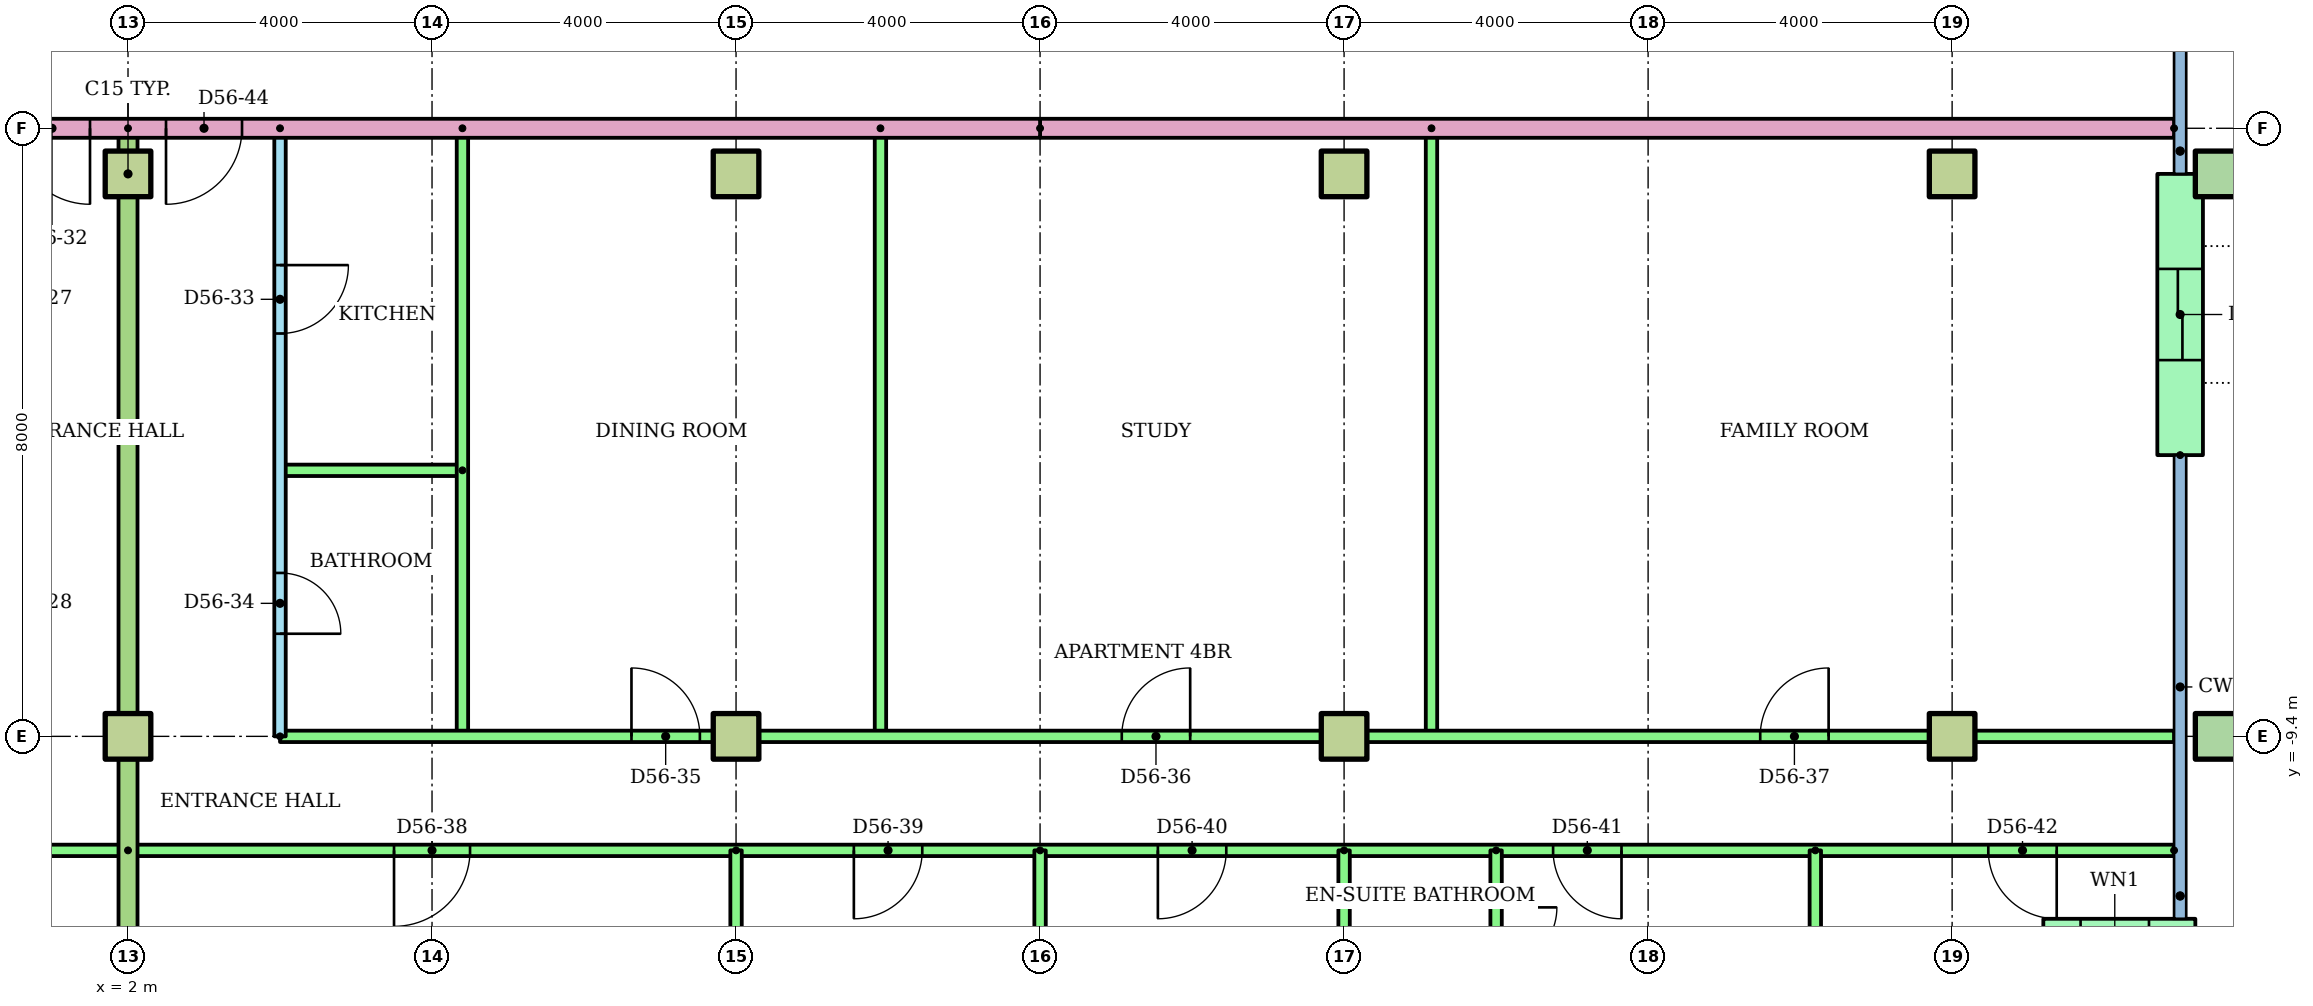
"""IFC4 building model, lengths in metres.
Left out: names, types, materials, properties, quantities, classifications, styles, units other than length and angle.
Written with IfcOpenShell. Run it as: python <this file> out.ifc"""

import sys

from ifc_helpers import new_model, si_unit, direction, frame, frame_2d, origin, origin_2d, place, context, subcontext, project, spatial, rectangle, hollow_rectangle, extrude, element, fill, save


model = new_model("IFC4")
c1 = context("Model", 3, precision=1e-05, world=origin(), true_north=direction((0.0, 1.0)))
c2 = subcontext(c1, "Body", "Model", "MODEL_VIEW")
j1 = project(units=[si_unit("LENGTHUNIT", "METRE"), si_unit("PLANEANGLEUNIT", "RADIAN")], contexts=[c1])
p1 = place(None, origin())
s1 = spatial("IfcSite", under=j1, at=p1, CompositionType="ELEMENT")
p2 = place(p1, origin())
s2 = spatial("IfcBuilding", under=s1, at=p2, CompositionType="ELEMENT")
p3 = place(p2, frame((0.0, 0.0, 217.2)))
s3 = spatial("IfcBuildingStorey", under=s2, at=p3, CompositionType="ELEMENT", Elevation=217.2)
for number, where in (
    (1, (2.0, -9.4, 0.0)),
    (2, (10.0, -9.4, 0.0)),
    (3, (18.0, -9.4, 0.0)),
    (4, (26.0, -9.4, 0.0)),
):
    element("IfcColumn", number, at=place(p3, frame(where)), inside=s3, PredefinedType="COLUMN", context=c2, shape_type="SweptSolid", body=[
        extrude(rectangle(XDim=0.6, YDim=0.6, at=origin_2d()), origin(), (0.0, 0.0, 1.0), 3.2),
    ])
p4 = place(p3, frame((29.5, -9.4, 0.0)))
e5 = element("IfcColumn", 5, at=p4, inside=s3, PredefinedType="COLUMN", context=c2, shape_type="SweptSolid", body=[
    extrude(hollow_rectangle(XDim=0.6, YDim=0.6, WallThickness=0.03, at=origin_2d()), origin(), (0.0, 0.0, 1.0), 3.2),
])
for number, where in (
    (6, (2.0, -2.0, 0.0)),
    (7, (10.0, -2.0, 0.0)),
    (8, (18.0, -2.0, 0.0)),
    (9, (26.0, -2.0, 0.0)),
):
    element("IfcColumn", number, at=place(p3, frame(where)), inside=s3, PredefinedType="COLUMN", context=c2, shape_type="SweptSolid", body=[
        extrude(rectangle(XDim=0.6, YDim=0.6, at=origin_2d()), origin(), (0.0, 0.0, 1.0), 3.2),
    ])
p5 = place(p3, frame((29.5, -2.0, 0.0)))
e10 = element("IfcColumn", 10, at=p5, inside=s3, PredefinedType="COLUMN", context=c2, shape_type="SweptSolid", body=[
    extrude(hollow_rectangle(XDim=0.6, YDim=0.6, WallThickness=0.03, at=origin_2d()), origin(), (0.0, 0.0, 1.0), 3.2),
])
p6 = place(p3, frame((27.2, -12.1, 0.0)))
e11 = element("IfcWall", 11, at=p6, inside=s3, PredefinedType="STANDARD", context=c2, shape_type="SweptSolid", body=[
    extrude(rectangle(XDim=2.0, YDim=0.6, at=frame_2d((1.0, 0.0))), origin(), (0.0, 0.0, 1.0), 2.92),
])
p7 = place(p6, frame((0.49, 0.0, 0.9)))
e12 = element("IfcOpeningElement", 12, at=p7, cuts=e11, PredefinedType="OPENING", context=c2, shape_type="SweptSolid", body=[
    extrude(rectangle(XDim=0.9, YDim=1.5, at=frame_2d((0.45, 0.75))), frame((0.0, 0.31, 0.0), z_axis=(0.0, -1.0, 0.0), x_axis=(1.0, 0.0, 0.0)), (0.0, 0.0, 1.0), 0.62),
])
p8 = place(p3, frame((29.0, -5.7, 0.0), z_axis=(0.0, 0.0, 1.0), x_axis=(0.0, 1.0, 0.0)))
e13 = element("IfcWall", 13, at=p8, inside=s3, PredefinedType="STANDARD", context=c2, shape_type="SweptSolid", body=[
    extrude(rectangle(XDim=3.7, YDim=0.6, at=frame_2d((1.85, 0.0))), origin(), (0.0, 0.0, 1.0), 2.92),
])
p9 = place(p8, frame((1.25, 0.0, 0.0)))
e14 = element("IfcOpeningElement", 14, at=p9, cuts=e13, PredefinedType="OPENING", context=c2, shape_type="SweptSolid", body=[
    extrude(rectangle(XDim=1.2, YDim=2.1, at=frame_2d((0.6, 1.05))), frame((0.0, 0.31, 0.0), z_axis=(0.0, -1.0, 0.0), x_axis=(1.0, 0.0, 0.0)), (0.0, 0.0, 1.0), 0.62),
])
p10 = place(p3, frame((2.0, -10.9, 0.0), z_axis=(0.0, 0.0, 1.0), x_axis=(-1.0, 0.0, 0.0)))
e15 = element("IfcWall", 15, at=p10, inside=s3, PredefinedType="PARTITIONING", context=c2, shape_type="SweptSolid", body=[
    extrude(rectangle(XDim=8.0, YDim=0.15, at=frame_2d((4.0, 0.0))), origin(), (0.0, 0.0, 1.0), 2.4),
])
p11 = place(p10, frame((5.55, 0.0, 0.0)))
e16 = element("IfcOpeningElement", 16, at=p11, cuts=e15, PredefinedType="OPENING", context=c2, shape_type="SweptSolid", body=[
    extrude(rectangle(XDim=0.9, YDim=2.1, at=frame_2d((0.45, 1.05))), frame((0.0, 0.085, 0.0), z_axis=(0.0, -1.0, 0.0), x_axis=(1.0, 0.0, 0.0)), (0.0, 0.0, 1.0), 0.17),
])
p12 = place(p10, frame((1.5, 0.0, 0.0)))
e17 = element("IfcOpeningElement", 17, at=p12, cuts=e15, PredefinedType="OPENING", context=c2, shape_type="SweptSolid", body=[
    extrude(rectangle(XDim=1.0, YDim=2.1, at=frame_2d((0.5, 1.05))), frame((0.0, 0.085, 0.0), z_axis=(0.0, -1.0, 0.0), x_axis=(1.0, 0.0, 0.0)), (0.0, 0.0, 1.0), 0.17),
])
p13 = place(p3, frame((4.0, -1.4, 0.0), z_axis=(0.0, 0.0, 1.0), x_axis=(0.0, -1.0, 0.0)))
e18 = element("IfcWall", 18, at=p13, inside=s3, PredefinedType="PARTITIONING", context=c2, shape_type="SweptSolid", body=[
    extrude(rectangle(XDim=8.0, YDim=0.15, at=frame_2d((4.0, 0.0))), origin(), (0.0, 0.0, 1.0), 2.4),
])
p14 = place(p13, frame((1.8, 0.0, 0.0)))
e19 = element("IfcOpeningElement", 19, at=p14, cuts=e18, PredefinedType="OPENING", context=c2, shape_type="SweptSolid", body=[
    extrude(rectangle(XDim=0.9, YDim=2.1, at=frame_2d((0.45, 1.05))), frame((0.0, 0.085, 0.0), z_axis=(0.0, -1.0, 0.0), x_axis=(1.0, 0.0, 0.0)), (0.0, 0.0, 1.0), 0.17),
])
p15 = place(p13, frame((5.85, 0.0, 0.0)))
e20 = element("IfcOpeningElement", 20, at=p15, cuts=e18, PredefinedType="OPENING", context=c2, shape_type="SweptSolid", body=[
    extrude(rectangle(XDim=0.8, YDim=2.1, at=frame_2d((0.4, 1.05))), frame((0.0, 0.085, 0.0), z_axis=(0.0, -1.0, 0.0), x_axis=(1.0, 0.0, 0.0)), (0.0, 0.0, 1.0), 0.17),
])
p16 = place(p3, frame((6.4, -5.9, 0.0), z_axis=(0.0, 0.0, 1.0), x_axis=(-1.0, 0.0, 0.0)))
e21 = element("IfcWall", 21, at=p16, inside=s3, PredefinedType="PARTITIONING", context=c2, shape_type="SweptSolid", body=[
    extrude(rectangle(XDim=2.4, YDim=0.15, at=frame_2d((1.2, 0.0))), origin(), (0.0, 0.0, 1.0), 2.4),
])
for number, where, z_axis, x_axis in (
    (22, (6.4, -1.4, 0.0), (0.0, 0.0, 1.0), (0.0, -1.0, 0.0)),
    (23, (11.9, -1.4, 0.0), (0.0, 0.0, 1.0), (0.0, -1.0, 0.0)),
    (24, (19.15, -1.4, 0.0), (0.0, 0.0, 1.0), (0.0, -1.0, 0.0)),
):
    element("IfcWall", number, at=place(p3, frame(where, z_axis=z_axis, x_axis=x_axis)), inside=s3, PredefinedType="PARTITIONING", context=c2, shape_type="SweptSolid", body=[
        extrude(rectangle(XDim=8.0, YDim=0.15, at=frame_2d((4.0, 0.0))), origin(), (0.0, 0.0, 1.0), 2.4),
    ])
p17 = place(p3, frame((4.0, -9.4, 0.0)))
e25 = element("IfcWall", 25, at=p17, inside=s3, PredefinedType="PARTITIONING", context=c2, shape_type="SweptSolid", body=[
    extrude(rectangle(XDim=24.92, YDim=0.15, at=frame_2d((12.46, 0.0))), origin(), (0.0, 0.0, 1.0), 2.4),
])
p18 = place(p17, frame((4.624, 0.0, 0.0)))
e26 = element("IfcOpeningElement", 26, at=p18, cuts=e25, PredefinedType="OPENING", context=c2, shape_type="SweptSolid", body=[
    extrude(rectangle(XDim=0.9, YDim=2.1, at=frame_2d((0.45, 1.05))), frame((0.0, 0.085, 0.0), z_axis=(0.0, -1.0, 0.0), x_axis=(1.0, 0.0, 0.0)), (0.0, 0.0, 1.0), 0.17),
])
p19 = place(p17, frame((11.075, 0.0, 0.0)))
e27 = element("IfcOpeningElement", 27, at=p19, cuts=e25, PredefinedType="OPENING", context=c2, shape_type="SweptSolid", body=[
    extrude(rectangle(XDim=0.9, YDim=2.1, at=frame_2d((0.45, 1.05))), frame((0.0, 0.085, 0.0), z_axis=(0.0, -1.0, 0.0), x_axis=(1.0, 0.0, 0.0)), (0.0, 0.0, 1.0), 0.17),
])
p20 = place(p17, frame((19.475, 0.0, 0.0)))
e28 = element("IfcOpeningElement", 28, at=p20, cuts=e25, PredefinedType="OPENING", context=c2, shape_type="SweptSolid", body=[
    extrude(rectangle(XDim=0.9, YDim=2.1, at=frame_2d((0.45, 1.05))), frame((0.0, 0.085, 0.0), z_axis=(0.0, -1.0, 0.0), x_axis=(1.0, 0.0, 0.0)), (0.0, 0.0, 1.0), 0.17),
])
p21 = place(p3, frame((28.92, -10.9, 0.0), z_axis=(0.0, 0.0, 1.0), x_axis=(-1.0, 0.0, 0.0)))
e29 = element("IfcWall", 29, at=p21, inside=s3, PredefinedType="PARTITIONING", context=c2, shape_type="SweptSolid", body=[
    extrude(rectangle(XDim=26.92, YDim=0.15, at=frame_2d((13.46, 0.0))), origin(), (0.0, 0.0, 1.0), 2.4),
])
p22 = place(p21, frame((22.42, 0.0, 0.0)))
e30 = element("IfcOpeningElement", 30, at=p22, cuts=e29, PredefinedType="OPENING", context=c2, shape_type="SweptSolid", body=[
    extrude(rectangle(XDim=1.0, YDim=2.1, at=frame_2d((0.5, 1.05))), frame((0.0, 0.085, 0.0), z_axis=(0.0, -1.0, 0.0), x_axis=(1.0, 0.0, 0.0)), (0.0, 0.0, 1.0), 0.17),
])
p23 = place(p21, frame((16.47, 0.0, 0.0)))
e31 = element("IfcOpeningElement", 31, at=p23, cuts=e29, PredefinedType="OPENING", context=c2, shape_type="SweptSolid", body=[
    extrude(rectangle(XDim=0.9, YDim=2.1, at=frame_2d((0.45, 1.05))), frame((0.0, 0.085, 0.0), z_axis=(0.0, -1.0, 0.0), x_axis=(1.0, 0.0, 0.0)), (0.0, 0.0, 1.0), 0.17),
])
p24 = place(p21, frame((12.47, 0.0, 0.0)))
e32 = element("IfcOpeningElement", 32, at=p24, cuts=e29, PredefinedType="OPENING", context=c2, shape_type="SweptSolid", body=[
    extrude(rectangle(XDim=0.9, YDim=2.1, at=frame_2d((0.45, 1.05))), frame((0.0, 0.085, 0.0), z_axis=(0.0, -1.0, 0.0), x_axis=(1.0, 0.0, 0.0)), (0.0, 0.0, 1.0), 0.17),
])
p25 = place(p21, frame((7.27, 0.0, 0.0)))
e33 = element("IfcOpeningElement", 33, at=p25, cuts=e29, PredefinedType="OPENING", context=c2, shape_type="SweptSolid", body=[
    extrude(rectangle(XDim=0.9, YDim=2.1, at=frame_2d((0.45, 1.05))), frame((0.0, 0.085, 0.0), z_axis=(0.0, -1.0, 0.0), x_axis=(1.0, 0.0, 0.0)), (0.0, 0.0, 1.0), 0.17),
])
p26 = place(p21, frame((1.544, 0.0, 0.0)))
e34 = element("IfcOpeningElement", 34, at=p26, cuts=e29, PredefinedType="OPENING", context=c2, shape_type="SweptSolid", body=[
    extrude(rectangle(XDim=0.9, YDim=2.1, at=frame_2d((0.45, 1.05))), frame((0.0, 0.085, 0.0), z_axis=(0.0, -1.0, 0.0), x_axis=(1.0, 0.0, 0.0)), (0.0, 0.0, 1.0), 0.17),
])
p27 = place(p3, frame((10.0, -10.9, 0.0), z_axis=(0.0, 0.0, 1.0), x_axis=(0.0, -1.0, 0.0)))
e35 = element("IfcWall", 35, at=p27, inside=s3, PredefinedType="PARTITIONING", context=c2, shape_type="SweptSolid", body=[
    extrude(rectangle(XDim=5.61, YDim=0.15, at=frame_2d((2.805, 0.0))), origin(), (0.0, 0.0, 1.0), 2.4),
])
p28 = place(p3, frame((14.0, -10.9, 0.0), z_axis=(0.0, 0.0, 1.0), x_axis=(0.0, -1.0, 0.0)))
e36 = element("IfcWall", 36, at=p28, inside=s3, PredefinedType="PARTITIONING", context=c2, shape_type="SweptSolid", body=[
    extrude(rectangle(XDim=5.621, YDim=0.15, at=frame_2d((2.811, 0.0))), origin(), (0.0, 0.0, 1.0), 2.4),
])
p29 = place(p3, frame((18.0, -10.9, 0.0), z_axis=(0.0, 0.0, 1.0), x_axis=(0.0, -1.0, 0.0)))
e37 = element("IfcWall", 37, at=p29, inside=s3, PredefinedType="PARTITIONING", context=c2, shape_type="SweptSolid", body=[
    extrude(rectangle(XDim=5.61, YDim=0.15, at=frame_2d((2.805, 0.0))), origin(), (0.0, 0.0, 1.0), 2.4),
])
p30 = place(p3, frame((24.2, -10.9, 0.0), z_axis=(0.0, 0.0, 1.0), x_axis=(0.0, -1.0, 0.0)))
e38 = element("IfcWall", 38, at=p30, inside=s3, PredefinedType="PARTITIONING", context=c2, shape_type="SweptSolid", body=[
    extrude(rectangle(XDim=3.82, YDim=0.15, at=frame_2d((1.91, 0.0))), origin(), (0.0, 0.0, 1.0), 2.4),
])
p31 = place(p3, frame((20.0, -10.9, 0.0), z_axis=(0.0, 0.0, 1.0), x_axis=(0.0, -1.0, 0.0)))
e39 = element("IfcWall", 39, at=p31, inside=s3, PredefinedType="PARTITIONING", context=c2, shape_type="SweptSolid", body=[
    extrude(rectangle(XDim=2.3, YDim=0.15, at=frame_2d((1.15, 0.0))), origin(), (0.0, 0.0, 1.0), 2.4),
])
p32 = place(p31, frame((0.75, 0.0, 0.0)))
e40 = element("IfcOpeningElement", 40, at=p32, cuts=e39, PredefinedType="OPENING", context=c2, shape_type="SweptSolid", body=[
    extrude(rectangle(XDim=0.8, YDim=2.1, at=frame_2d((0.4, 1.05))), frame((0.0, 0.085, 0.0), z_axis=(0.0, -1.0, 0.0), x_axis=(1.0, 0.0, 0.0)), (0.0, 0.0, 1.0), 0.17),
])
p33 = place(p3, frame((2.0, -1.4, 0.0), z_axis=(0.0, 0.0, 1.0), x_axis=(0.0, -1.0, 0.0)))
e41 = element("IfcWall", 41, at=p33, inside=s3, PredefinedType="PARTITIONING", context=c2, shape_type="SweptSolid", body=[
    extrude(rectangle(XDim=15.11, YDim=0.25, at=frame_2d((7.555, 0.0))), origin(), (0.0, 0.0, 1.0), 2.4),
])
p34 = place(p3, frame((28.92, -1.4, 0.0), z_axis=(0.0, 0.0, 1.0), x_axis=(-1.0, 0.0, 0.0)))
e42 = element("IfcWall", 42, at=p34, inside=s3, PredefinedType="PARTITIONING", context=c2, shape_type="SweptSolid", body=[
    extrude(rectangle(XDim=14.92, YDim=0.25, at=frame_2d((7.46, 0.0))), origin(), (0.0, 0.0, 1.0), 2.4),
])
p35 = place(p3, frame((14.0, -1.4, 0.0), z_axis=(0.0, 0.0, 1.0), x_axis=(-1.0, 0.0, 0.0)))
e43 = element("IfcWall", 43, at=p35, inside=s3, PredefinedType="PARTITIONING", context=c2, shape_type="SweptSolid", body=[
    extrude(rectangle(XDim=28.0, YDim=0.25, at=frame_2d((14.0, 0.0))), origin(), (0.0, 0.0, 1.0), 2.4),
])
p36 = place(p35, frame((20.5, 0.0, 0.0)))
e44 = element("IfcOpeningElement", 44, at=p36, cuts=e43, PredefinedType="OPENING", context=c2, shape_type="SweptSolid", body=[
    extrude(rectangle(XDim=1.0, YDim=2.1, at=frame_2d((0.5, 1.05))), frame((0.0, 0.135, 0.0), z_axis=(0.0, -1.0, 0.0), x_axis=(1.0, 0.0, 0.0)), (0.0, 0.0, 1.0), 0.27),
])
p37 = place(p35, frame((12.5, 0.0, 0.0)))
e45 = element("IfcOpeningElement", 45, at=p37, cuts=e43, PredefinedType="OPENING", context=c2, shape_type="SweptSolid", body=[
    extrude(rectangle(XDim=1.0, YDim=2.1, at=frame_2d((0.5, 1.05))), frame((0.0, 0.135, 0.0), z_axis=(0.0, -1.0, 0.0), x_axis=(1.0, 0.0, 0.0)), (0.0, 0.0, 1.0), 0.27),
])
p38 = place(p35, frame((10.5, 0.0, 0.0)))
e46 = element("IfcOpeningElement", 46, at=p38, cuts=e43, PredefinedType="OPENING", context=c2, shape_type="SweptSolid", body=[
    extrude(rectangle(XDim=1.0, YDim=2.1, at=frame_2d((0.5, 1.05))), frame((0.0, 0.135, 0.0), z_axis=(0.0, -1.0, 0.0), x_axis=(1.0, 0.0, 0.0)), (0.0, 0.0, 1.0), 0.27),
])
p39 = place(p37, origin())
e47 = element("IfcDoor", 47, at=p39, inside=s3, OperationType="SINGLE_SWING_LEFT", PredefinedType="DOOR", context=c2, shape_type="SweptSolid", body=[
    extrude(rectangle(XDim=1.0, YDim=2.1, at=frame_2d((0.5, 1.05))), frame((0.0, 0.025, 0.0), z_axis=(0.0, -1.0, 0.0), x_axis=(1.0, 0.0, 0.0)), (0.0, 0.0, 1.0), 0.05),
])
fill(e45, e47)
p40 = place(p14, origin())
e48 = element("IfcDoor", 48, at=p40, inside=s3, OperationType="SINGLE_SWING_LEFT", PredefinedType="DOOR", context=c2, shape_type="SweptSolid", body=[
    extrude(rectangle(XDim=0.9, YDim=2.1, at=frame_2d((0.45, 1.05))), frame((0.0, 0.025, 0.0), z_axis=(0.0, -1.0, 0.0), x_axis=(1.0, 0.0, 0.0)), (0.0, 0.0, 1.0), 0.05),
])
fill(e19, e48)
p41 = place(p15, origin())
e49 = element("IfcDoor", 49, at=p41, inside=s3, OperationType="SINGLE_SWING_RIGHT", PredefinedType="DOOR", context=c2, shape_type="SweptSolid", body=[
    extrude(rectangle(XDim=0.8, YDim=2.1, at=frame_2d((0.4, 1.05))), frame((0.0, 0.025, 0.0), z_axis=(0.0, -1.0, 0.0), x_axis=(1.0, 0.0, 0.0)), (0.0, 0.0, 1.0), 0.05),
])
fill(e20, e49)
p42 = place(p18, origin())
e50 = element("IfcDoor", 50, at=p42, inside=s3, OperationType="SINGLE_SWING_LEFT", PredefinedType="DOOR", context=c2, shape_type="SweptSolid", body=[
    extrude(rectangle(XDim=0.9, YDim=2.1, at=frame_2d((0.45, 1.05))), frame((0.0, 0.025, 0.0), z_axis=(0.0, -1.0, 0.0), x_axis=(1.0, 0.0, 0.0)), (0.0, 0.0, 1.0), 0.05),
])
fill(e26, e50)
p43 = place(p19, origin())
e51 = element("IfcDoor", 51, at=p43, inside=s3, OperationType="SINGLE_SWING_RIGHT", PredefinedType="DOOR", context=c2, shape_type="SweptSolid", body=[
    extrude(rectangle(XDim=0.9, YDim=2.1, at=frame_2d((0.45, 1.05))), frame((0.0, 0.025, 0.0), z_axis=(0.0, -1.0, 0.0), x_axis=(1.0, 0.0, 0.0)), (0.0, 0.0, 1.0), 0.05),
])
fill(e27, e51)
p44 = place(p20, origin())
e52 = element("IfcDoor", 52, at=p44, inside=s3, OperationType="SINGLE_SWING_RIGHT", PredefinedType="DOOR", context=c2, shape_type="SweptSolid", body=[
    extrude(rectangle(XDim=0.9, YDim=2.1, at=frame_2d((0.45, 1.05))), frame((0.0, 0.025, 0.0), z_axis=(0.0, -1.0, 0.0), x_axis=(1.0, 0.0, 0.0)), (0.0, 0.0, 1.0), 0.05),
])
fill(e28, e52)
p45 = place(p22, origin())
e53 = element("IfcDoor", 53, at=p45, inside=s3, OperationType="SINGLE_SWING_RIGHT", PredefinedType="DOOR", context=c2, shape_type="SweptSolid", body=[
    extrude(rectangle(XDim=1.0, YDim=2.1, at=frame_2d((0.5, 1.05))), frame((0.0, 0.025, 0.0), z_axis=(0.0, -1.0, 0.0), x_axis=(1.0, 0.0, 0.0)), (0.0, 0.0, 1.0), 0.05),
])
fill(e30, e53)
p46 = place(p23, origin())
e54 = element("IfcDoor", 54, at=p46, inside=s3, OperationType="SINGLE_SWING_RIGHT", PredefinedType="DOOR", context=c2, shape_type="SweptSolid", body=[
    extrude(rectangle(XDim=0.9, YDim=2.1, at=frame_2d((0.45, 1.05))), frame((0.0, 0.025, 0.0), z_axis=(0.0, -1.0, 0.0), x_axis=(1.0, 0.0, 0.0)), (0.0, 0.0, 1.0), 0.05),
])
fill(e31, e54)
p47 = place(p24, origin())
e55 = element("IfcDoor", 55, at=p47, inside=s3, OperationType="SINGLE_SWING_RIGHT", PredefinedType="DOOR", context=c2, shape_type="SweptSolid", body=[
    extrude(rectangle(XDim=0.9, YDim=2.1, at=frame_2d((0.45, 1.05))), frame((0.0, 0.025, 0.0), z_axis=(0.0, -1.0, 0.0), x_axis=(1.0, 0.0, 0.0)), (0.0, 0.0, 1.0), 0.05),
])
fill(e32, e55)
p48 = place(p25, origin())
e56 = element("IfcDoor", 56, at=p48, inside=s3, OperationType="SINGLE_SWING_LEFT", PredefinedType="DOOR", context=c2, shape_type="SweptSolid", body=[
    extrude(rectangle(XDim=0.9, YDim=2.1, at=frame_2d((0.45, 1.05))), frame((0.0, 0.025, 0.0), z_axis=(0.0, -1.0, 0.0), x_axis=(1.0, 0.0, 0.0)), (0.0, 0.0, 1.0), 0.05),
])
fill(e33, e56)
p49 = place(p26, origin())
e57 = element("IfcDoor", 57, at=p49, inside=s3, OperationType="SINGLE_SWING_LEFT", PredefinedType="DOOR", context=c2, shape_type="SweptSolid", body=[
    extrude(rectangle(XDim=0.9, YDim=2.1, at=frame_2d((0.45, 1.05))), frame((0.0, 0.025, 0.0), z_axis=(0.0, -1.0, 0.0), x_axis=(1.0, 0.0, 0.0)), (0.0, 0.0, 1.0), 0.05),
])
fill(e34, e57)
p50 = place(p32, origin())
e58 = element("IfcDoor", 58, at=p50, inside=s3, OperationType="SINGLE_SWING_LEFT", PredefinedType="DOOR", context=c2, shape_type="SweptSolid", body=[
    extrude(rectangle(XDim=0.8, YDim=2.1, at=frame_2d((0.4, 1.05))), frame((0.0, 0.025, 0.0), z_axis=(0.0, -1.0, 0.0), x_axis=(1.0, 0.0, 0.0)), (0.0, 0.0, 1.0), 0.05),
])
fill(e40, e58)
p51 = place(p38, origin())
e59 = element("IfcDoor", 59, at=p51, inside=s3, OperationType="SINGLE_SWING_RIGHT", PredefinedType="DOOR", context=c2, shape_type="SweptSolid", body=[
    extrude(rectangle(XDim=1.0, YDim=2.1, at=frame_2d((0.5, 1.05))), frame((0.0, 0.025, 0.0), z_axis=(0.0, -1.0, 0.0), x_axis=(1.0, 0.0, 0.0)), (0.0, 0.0, 1.0), 0.05),
])
fill(e46, e59)
p52 = place(p9, origin())
e60 = element("IfcDoor", 60, at=p52, inside=s3, OperationType="SLIDING_TO_LEFT", PredefinedType="DOOR", context=c2, shape_type="SweptSolid", body=[
    extrude(rectangle(XDim=1.2, YDim=2.1, at=frame_2d((0.6, 1.05))), frame((0.0, 0.025, 0.0), z_axis=(0.0, -1.0, 0.0), x_axis=(1.0, 0.0, 0.0)), (0.0, 0.0, 1.0), 0.05),
])
fill(e14, e60)
save(model, sys.argv[1])
